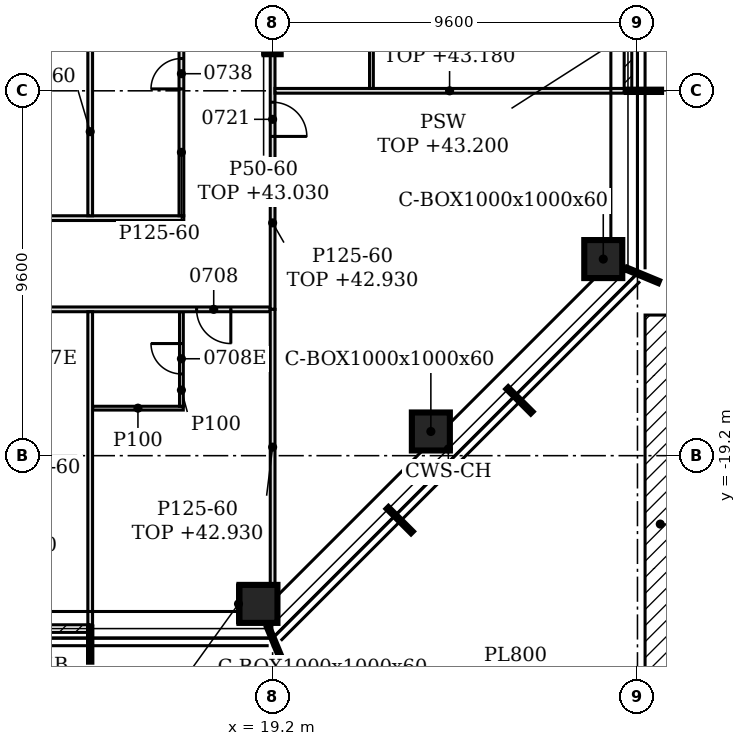
"""IFC4 building model, lengths in metres.
Left out: names, types, materials, properties, quantities, classifications, styles, units other than length and angle.
Written with IfcOpenShell. Run it as: python <this file> out.ifc"""

import sys

from ifc_helpers import new_model, si_unit, direction, frame, frame_2d, origin, origin_2d, place, context, subcontext, project, spatial, polyline, rectangle, hollow_rectangle, i_section, outline, extrude, element, fill, save


model = new_model("IFC4")
c1 = context("Model", 3, precision=1e-05, world=origin(), true_north=direction((0.0, 1.0)))
c2 = subcontext(c1, "Body", "Model", "MODEL_VIEW")
j1 = project(units=[si_unit("LENGTHUNIT", "METRE"), si_unit("PLANEANGLEUNIT", "RADIAN")], contexts=[c1])
p1 = place(None, origin())
s1 = spatial("IfcSite", under=j1, at=p1, CompositionType="ELEMENT")
p2 = place(p1, origin())
s2 = spatial("IfcBuilding", under=s1, at=p2, CompositionType="ELEMENT")
p3 = place(p2, frame((0.0, 0.0, 40.2)))
s3 = spatial("IfcBuildingStorey", under=s2, at=p3, CompositionType="ELEMENT", Elevation=40.2)
for number, where, z_axis, x_axis in (
    (1, (18.827, -23.1, -0.15), (0.0, 0.0, 1.0), (1.0, 0.0, 0.0)),
    (2, (23.364, -18.564, -0.15), (0.0, 0.0, 1.0), (1.0, 0.0, 0.0)),
    (3, (27.9, -14.027, -0.15), (0.0, 0.0, 1.0), (1.0, 0.0, 0.0)),
):
    element("IfcColumn", number, at=place(p3, frame(where, z_axis=z_axis, x_axis=x_axis)), inside=s3, PredefinedType="COLUMN", context=c2, shape_type="SweptSolid", body=[
        extrude(hollow_rectangle(XDim=1.0, YDim=1.0, WallThickness=0.06, at=origin_2d()), origin(), (0.0, 0.0, 1.0), 3.6),
    ])
p4 = place(p3, frame((19.2, -8.4, -0.15), z_axis=(0.0, 0.0, 1.0), x_axis=(1.0, 0.0, 0.0)))
e4 = element("IfcColumn", 4, at=p4, inside=s3, PredefinedType="COLUMN", context=c2, shape_type="SweptSolid", body=[
    extrude(i_section(OverallWidth=0.424, OverallDepth=0.474, WebThickness=0.048, FlangeThickness=0.077, FilletRadius=0.015, at=origin_2d()), origin(), (0.0, 0.0, 1.0), 3.6),
])
p5 = place(p3, frame((29.4, -26.5, 0.0), z_axis=(0.0, 0.0, 1.0), x_axis=(0.0, 1.0, 0.0)))
e5 = element("IfcWall", 5, at=p5, inside=s3, PredefinedType="NOTDEFINED", context=c2, shape_type="SweptSolid", body=[
    extrude(rectangle(XDim=11.0, YDim=0.8, at=frame_2d((5.5, 0.0))), origin(), (0.0, 0.0, 1.0), 0.6),
])
p6 = place(p3, frame((9.63, -23.75, 0.0), z_axis=(0.0, 0.0, 1.0), x_axis=(1.0, 0.0, 0.0)))
e6 = element("IfcWall", 6, at=p6, inside=s3, PredefinedType="NOTDEFINED", context=c2, shape_type="SweptSolid", body=[
    extrude(rectangle(XDim=4.74, YDim=0.2, at=frame_2d((2.37, 0.0))), origin(), (0.0, 0.0, 1.0), 3.45),
])
p7 = place(p6, frame((1.17, 0.0, 0.0)))
e7 = element("IfcOpeningElement", 7, at=p7, cuts=e6, PredefinedType="OPENING", context=c2, shape_type="SweptSolid", body=[
    extrude(rectangle(XDim=2.4, YDim=2.4, at=frame_2d((1.2, 1.2))), frame((0.0, 0.11, 0.0), z_axis=(0.0, -1.0, 0.0), x_axis=(1.0, 0.0, 0.0)), (0.0, 0.0, 1.0), 0.22),
])
p8 = place(p3, frame((28.55, -9.57, 0.0), z_axis=(0.0, 0.0, 1.0), x_axis=(0.0, 1.0, 0.0)))
e8 = element("IfcWall", 8, at=p8, inside=s3, PredefinedType="NOTDEFINED", context=c2, shape_type="SweptSolid", body=[
    extrude(rectangle(XDim=4.74, YDim=0.2, at=frame_2d((2.37, 0.0))), origin(), (0.0, 0.0, 1.0), 3.45),
])
p9 = place(p8, frame((1.17, 0.0, 0.0)))
e9 = element("IfcOpeningElement", 9, at=p9, cuts=e8, PredefinedType="OPENING", context=c2, shape_type="SweptSolid", body=[
    extrude(rectangle(XDim=2.4, YDim=2.4, at=frame_2d((1.2, 1.2))), frame((0.0, 0.11, 0.0), z_axis=(0.0, -1.0, 0.0), x_axis=(1.0, 0.0, 0.0)), (0.0, 0.0, 1.0), 0.22),
])
p10 = place(p3, frame((14.4, -23.65, 0.0), z_axis=(0.0, 0.0, 1.0), x_axis=(0.0, 1.0, 0.0)))
e10 = element("IfcWall", 10, at=p10, inside=s3, PredefinedType="PARTITIONING", context=c2, shape_type="SweptSolid", body=[
    extrude(outline(polyline([(0.0, 0.0), (8.237, 0.0), (8.238, 3.45), (4.555, 3.45), (4.553, 2.88), (4.345, 2.88), (4.343, 3.45), (0.7, 3.45), (0.698, 2.93), (0.4, 2.93), (0.398, 3.45), (0.0, 3.45), (0.0, 0.0)])), frame((0.0, 0.062, 0.0), z_axis=(0.0, -1.0, 0.0), x_axis=(1.0, 0.0, 0.0)), (0.0, 0.0, 1.0), 0.125),
])
p11 = place(p3, frame((19.2, -22.6, 0.0), z_axis=(0.0, 0.0, 1.0), x_axis=(0.0, 1.0, 0.0)))
e11 = element("IfcWall", 11, at=p11, inside=s3, PredefinedType="PARTITIONING", context=c2, shape_type="SweptSolid", body=[
    extrude(outline(polyline([(0.0, 0.0), (7.25, 0.0), (7.25, 2.73), (0.43, 2.73), (0.428, 2.63), (0.0, 2.63), (0.0, 0.0)])), frame((0.0, 0.062, 0.0), z_axis=(0.0, -1.0, 0.0), x_axis=(1.0, 0.0, 0.0)), (0.0, 0.0, 1.0), 0.125),
])
p12 = place(p3, frame((14.462, -17.95, 0.0), z_axis=(0.0, 0.0, 1.0), x_axis=(1.0, 0.0, 0.0)))
e12 = element("IfcWall", 12, at=p12, inside=s3, PredefinedType="PARTITIONING", context=c2, shape_type="SweptSolid", body=[
    extrude(rectangle(XDim=2.388, YDim=0.1, at=frame_2d((1.194, 0.0))), origin(), (0.0, 0.0, 1.0), 3.45),
])
p13 = place(p3, frame((16.8, -17.9, 0.0), z_axis=(0.0, 0.0, 1.0), x_axis=(0.0, 1.0, 0.0)))
e13 = element("IfcWall", 13, at=p13, inside=s3, PredefinedType="PARTITIONING", context=c2, shape_type="SweptSolid", body=[
    extrude(rectangle(XDim=2.487, YDim=0.1, at=frame_2d((1.244, 0.0))), origin(), (0.0, 0.0, 1.0), 3.45),
])
p14 = place(p13, frame((0.85, 0.0, 0.0)))
e14 = element("IfcOpeningElement", 14, at=p14, cuts=e13, PredefinedType="OPENING", context=c2, shape_type="SweptSolid", body=[
    extrude(rectangle(XDim=0.8, YDim=2.1, at=frame_2d((0.4, 1.05))), frame((0.0, 0.06, 0.0), z_axis=(0.0, -1.0, 0.0), x_axis=(1.0, 0.0, 0.0)), (0.0, 0.0, 1.0), 0.12),
])
p15 = place(p3, frame((-20.15, -15.35, 0.0), z_axis=(0.0, 0.0, 1.0), x_axis=(1.0, 0.0, 0.0)))
e15 = element("IfcWall", 15, at=p15, inside=s3, PredefinedType="PARTITIONING", context=c2, shape_type="SweptSolid", body=[
    extrude(outline(polyline([(0.0, 0.0), (39.287, 0.0), (39.288, 2.73), (39.2, 2.73), (39.198, 3.45), (27.5, 3.45), (27.498, 2.73), (27.2, 2.73), (27.198, 3.45), (15.5, 3.45), (15.498, 2.73), (15.2, 2.73), (15.198, 3.45), (5.9, 3.45), (5.898, 2.93), (5.6, 2.93), (5.598, 3.45), (0.0, 3.45), (0.0, 0.0)])), frame((0.0, 0.062, 0.0), z_axis=(0.0, -1.0, 0.0), x_axis=(1.0, 0.0, 0.0)), (0.0, 0.0, 1.0), 0.125),
])
p16 = place(p15, frame((4.55, 0.0, 0.0)))
e16 = element("IfcOpeningElement", 16, at=p16, cuts=e15, PredefinedType="OPENING", context=c2, shape_type="SweptSolid", body=[
    extrude(rectangle(XDim=0.9, YDim=2.1, at=frame_2d((0.45, 1.05))), frame((0.0, 0.073, 0.0), z_axis=(0.0, -1.0, 0.0), x_axis=(1.0, 0.0, 0.0)), (0.0, 0.0, 1.0), 0.145),
])
p17 = place(p15, frame((7.136, 0.0, 0.0)))
e17 = element("IfcOpeningElement", 17, at=p17, cuts=e15, PredefinedType="OPENING", context=c2, shape_type="SweptSolid", body=[
    extrude(rectangle(XDim=0.9, YDim=2.1, at=frame_2d((0.45, 1.05))), frame((0.0, 0.073, 0.0), z_axis=(0.0, -1.0, 0.0), x_axis=(1.0, 0.0, 0.0)), (0.0, 0.0, 1.0), 0.145),
])
p18 = place(p15, frame((14.15, 0.0, 0.0)))
e18 = element("IfcOpeningElement", 18, at=p18, cuts=e15, PredefinedType="OPENING", context=c2, shape_type="SweptSolid", body=[
    extrude(rectangle(XDim=0.9, YDim=2.1, at=frame_2d((0.45, 1.05))), frame((0.0, 0.073, 0.0), z_axis=(0.0, -1.0, 0.0), x_axis=(1.0, 0.0, 0.0)), (0.0, 0.0, 1.0), 0.145),
])
p19 = place(p15, frame((16.55, 0.0, 0.0)))
e19 = element("IfcOpeningElement", 19, at=p19, cuts=e15, PredefinedType="OPENING", context=c2, shape_type="SweptSolid", body=[
    extrude(rectangle(XDim=0.9, YDim=2.1, at=frame_2d((0.45, 1.05))), frame((0.0, 0.073, 0.0), z_axis=(0.0, -1.0, 0.0), x_axis=(1.0, 0.0, 0.0)), (0.0, 0.0, 1.0), 0.145),
])
p20 = place(p15, frame((21.35, 0.0, 0.0)))
e20 = element("IfcOpeningElement", 20, at=p20, cuts=e15, PredefinedType="OPENING", context=c2, shape_type="SweptSolid", body=[
    extrude(rectangle(XDim=0.9, YDim=2.1, at=frame_2d((0.45, 1.05))), frame((0.0, 0.073, 0.0), z_axis=(0.0, -1.0, 0.0), x_axis=(1.0, 0.0, 0.0)), (0.0, 0.0, 1.0), 0.145),
])
p21 = place(p15, frame((28.364, 0.0, 0.0)))
e21 = element("IfcOpeningElement", 21, at=p21, cuts=e15, PredefinedType="OPENING", context=c2, shape_type="SweptSolid", body=[
    extrude(rectangle(XDim=0.9, YDim=2.1, at=frame_2d((0.45, 1.05))), frame((0.0, 0.073, 0.0), z_axis=(0.0, -1.0, 0.0), x_axis=(1.0, 0.0, 0.0)), (0.0, 0.0, 1.0), 0.145),
])
p22 = place(p15, frame((32.35, 0.0, 0.0)))
e22 = element("IfcOpeningElement", 22, at=p22, cuts=e15, PredefinedType="OPENING", context=c2, shape_type="SweptSolid", body=[
    extrude(rectangle(XDim=0.9, YDim=2.1, at=frame_2d((0.45, 1.05))), frame((0.0, 0.073, 0.0), z_axis=(0.0, -1.0, 0.0), x_axis=(1.0, 0.0, 0.0)), (0.0, 0.0, 1.0), 0.145),
])
p23 = place(p15, frame((37.35, 0.0, 0.0)))
e23 = element("IfcOpeningElement", 23, at=p23, cuts=e15, PredefinedType="OPENING", context=c2, shape_type="SweptSolid", body=[
    extrude(rectangle(XDim=0.9, YDim=2.1, at=frame_2d((0.45, 1.05))), frame((0.0, 0.073, 0.0), z_axis=(0.0, -1.0, 0.0), x_axis=(1.0, 0.0, 0.0)), (0.0, 0.0, 1.0), 0.145),
])
p24 = place(p3, frame((19.2, -15.35, 0.0), z_axis=(0.0, 0.0, 1.0), x_axis=(0.0, 1.0, 0.0)))
e24 = element("IfcWall", 24, at=p24, inside=s3, PredefinedType="PARTITIONING", context=c2, shape_type="SweptSolid", body=[
    extrude(rectangle(XDim=6.713, YDim=0.125, at=frame_2d((3.356, 0.0))), origin(), (0.0, 0.0, 1.0), 2.73),
])
p25 = place(p24, frame((4.55, 0.0, 0.0)))
e25 = element("IfcOpeningElement", 25, at=p25, cuts=e24, PredefinedType="OPENING", context=c2, shape_type="SweptSolid", body=[
    extrude(rectangle(XDim=0.9, YDim=2.1, at=frame_2d((0.45, 1.05))), frame((0.0, 0.073, 0.0), z_axis=(0.0, -1.0, 0.0), x_axis=(1.0, 0.0, 0.0)), (0.0, 0.0, 1.0), 0.145),
])
p26 = place(p3, frame((2.337, -12.95, 0.0), z_axis=(0.0, 0.0, 1.0), x_axis=(1.0, 0.0, 0.0)))
e26 = element("IfcWall", 26, at=p26, inside=s3, PredefinedType="PARTITIONING", context=c2, shape_type="SweptSolid", body=[
    extrude(outline(polyline([(0.0, 0.0), (14.525, 0.0), (14.525, 3.45), (5.012, 3.45), (5.01, 2.73), (4.712, 2.73), (4.71, 3.45), (0.0, 3.45), (0.0, 0.0)])), frame((0.0, 0.062, 0.0), z_axis=(0.0, -1.0, 0.0), x_axis=(1.0, 0.0, 0.0)), (0.0, 0.0, 1.0), 0.125),
])
p27 = place(p3, frame((14.4, -12.887, 0.0), z_axis=(0.0, 0.0, 1.0), x_axis=(0.0, 1.0, 0.0)))
e27 = element("IfcWall", 27, at=p27, inside=s3, PredefinedType="PARTITIONING", context=c2, shape_type="SweptSolid", body=[
    extrude(outline(polyline([(0.0, 0.0), (4.425, 0.0), (4.425, 2.83), (4.337, 2.83), (4.335, 3.45), (0.0, 3.45), (0.0, 0.0)])), frame((0.0, 0.062, 0.0), z_axis=(0.0, -1.0, 0.0), x_axis=(1.0, 0.0, 0.0)), (0.0, 0.0, 1.0), 0.125),
])
p28 = place(p3, frame((16.8, -12.887, 0.0), z_axis=(0.0, 0.0, 1.0), x_axis=(0.0, 1.0, 0.0)))
e28 = element("IfcWall", 28, at=p28, inside=s3, PredefinedType="PARTITIONING", context=c2, shape_type="SweptSolid", body=[
    extrude(outline(polyline([(0.0, 0.0), (4.425, 0.0), (4.425, 2.83), (4.337, 2.83), (4.335, 3.45), (0.0, 3.45), (0.0, 0.0)])), frame((0.0, 0.062, 0.0), z_axis=(0.0, -1.0, 0.0), x_axis=(1.0, 0.0, 0.0)), (0.0, 0.0, 1.0), 0.125),
])
p29 = place(p28, frame((3.337, 0.0, 0.0)))
e29 = element("IfcOpeningElement", 29, at=p29, cuts=e28, PredefinedType="OPENING", context=c2, shape_type="SweptSolid", body=[
    extrude(rectangle(XDim=0.8, YDim=2.1, at=frame_2d((0.4, 1.05))), frame((0.0, 0.073, 0.0), z_axis=(0.0, -1.0, 0.0), x_axis=(1.0, 0.0, 0.0)), (0.0, 0.0, 1.0), 0.145),
])
p30 = place(p3, frame((19.262, -9.6, 0.0), z_axis=(0.0, 0.0, 1.0), x_axis=(1.0, 0.0, 0.0)))
e30 = element("IfcWall", 30, at=p30, inside=s3, PredefinedType="PARTITIONING", context=c2, shape_type="SweptSolid", body=[
    extrude(outline(polyline([(0.0, 0.0), (9.188, 0.0), (9.188, 2.98), (8.788, 2.98), (8.785, 2.93), (8.488, 2.93), (8.486, 2.98), (0.087, 2.98), (0.085, 2.73), (0.0, 2.73), (0.0, 0.0)])), frame((0.0, 0.062, 0.0), z_axis=(0.0, -1.0, 0.0), x_axis=(1.0, 0.0, 0.0)), (0.0, 0.0, 1.0), 0.125),
])
p31 = place(p3, frame((21.8, -9.538, 0.0), z_axis=(0.0, 0.0, 1.0), x_axis=(0.0, 1.0, 0.0)))
e31 = element("IfcWall", 31, at=p31, inside=s3, PredefinedType="PARTITIONING", context=c2, shape_type="SweptSolid", body=[
    extrude(outline(polyline([(0.0, 0.0), (2.288, 0.0), (2.288, 3.45), (0.032, 3.45), (0.031, 2.98), (0.0, 2.98), (0.0, 0.0)])), frame((0.0, 0.05, 0.0), z_axis=(0.0, -1.0, 0.0), x_axis=(1.0, 0.0, 0.0)), (0.0, 0.0, 1.0), 0.1),
])
p32 = place(p3, frame((18.302, -23.6, 0.0), z_axis=(0.0, 0.0, 1.0), x_axis=(0.0, 1.0, 0.0)))
e32 = element("IfcWall", 32, at=p32, inside=s3, PredefinedType="PARTITIONING", context=c2, shape_type="SweptSolid", body=[
    extrude(rectangle(XDim=1.0, YDim=0.05, at=frame_2d((0.5, 0.0))), origin(), (0.0, 0.0, 1.0), 2.93),
])
p33 = place(p3, frame((18.963, -8.637, 0.0), z_axis=(0.0, 0.0, 1.0), x_axis=(0.0, 1.0, 0.0)))
e33 = element("IfcWall", 33, at=p33, inside=s3, PredefinedType="PARTITIONING", context=c2, shape_type="SweptSolid", body=[
    extrude(rectangle(XDim=0.474, YDim=0.05, at=frame_2d((0.237, 0.0))), origin(), (0.0, 0.0, 1.0), 2.83),
])
p34 = place(p23, frame((0.9, 0.0, 0.0), z_axis=(0.0, 0.0, 1.0), x_axis=(-1.0, 0.0, 0.0)))
e34 = element("IfcDoor", 34, at=p34, inside=s3, OperationType="SINGLE_SWING_LEFT", PredefinedType="DOOR", context=c2, shape_type="SweptSolid", body=[
    extrude(rectangle(XDim=0.9, YDim=2.1, at=frame_2d((0.45, 1.05))), frame((0.0, 0.025, 0.0), z_axis=(0.0, -1.0, 0.0), x_axis=(1.0, 0.0, 0.0)), (0.0, 0.0, 1.0), 0.05),
])
fill(e23, e34)
p35 = place(p14, origin())
e35 = element("IfcDoor", 35, at=p35, inside=s3, OperationType="SINGLE_SWING_RIGHT", PredefinedType="DOOR", context=c2, shape_type="SweptSolid", body=[
    extrude(rectangle(XDim=0.8, YDim=2.1, at=frame_2d((0.4, 1.05))), frame((0.0, 0.025, 0.0), z_axis=(0.0, -1.0, 0.0), x_axis=(1.0, 0.0, 0.0)), (0.0, 0.0, 1.0), 0.05),
])
fill(e14, e35)
p36 = place(p25, frame((0.9, 0.0, 0.0), z_axis=(0.0, 0.0, 1.0), x_axis=(-1.0, 0.0, 0.0)))
e36 = element("IfcDoor", 36, at=p36, inside=s3, OperationType="SINGLE_SWING_RIGHT", PredefinedType="DOOR", context=c2, shape_type="SweptSolid", body=[
    extrude(rectangle(XDim=0.9, YDim=2.1, at=frame_2d((0.45, 1.05))), frame((0.0, 0.025, 0.0), z_axis=(0.0, -1.0, 0.0), x_axis=(1.0, 0.0, 0.0)), (0.0, 0.0, 1.0), 0.05),
])
fill(e25, e36)
p37 = place(p29, origin())
e37 = element("IfcDoor", 37, at=p37, inside=s3, OperationType="SINGLE_SWING_LEFT", PredefinedType="DOOR", context=c2, shape_type="SweptSolid", body=[
    extrude(rectangle(XDim=0.8, YDim=2.1, at=frame_2d((0.4, 1.05))), frame((0.0, 0.025, 0.0), z_axis=(0.0, -1.0, 0.0), x_axis=(1.0, 0.0, 0.0)), (0.0, 0.0, 1.0), 0.05),
])
fill(e29, e37)
save(model, sys.argv[1])
